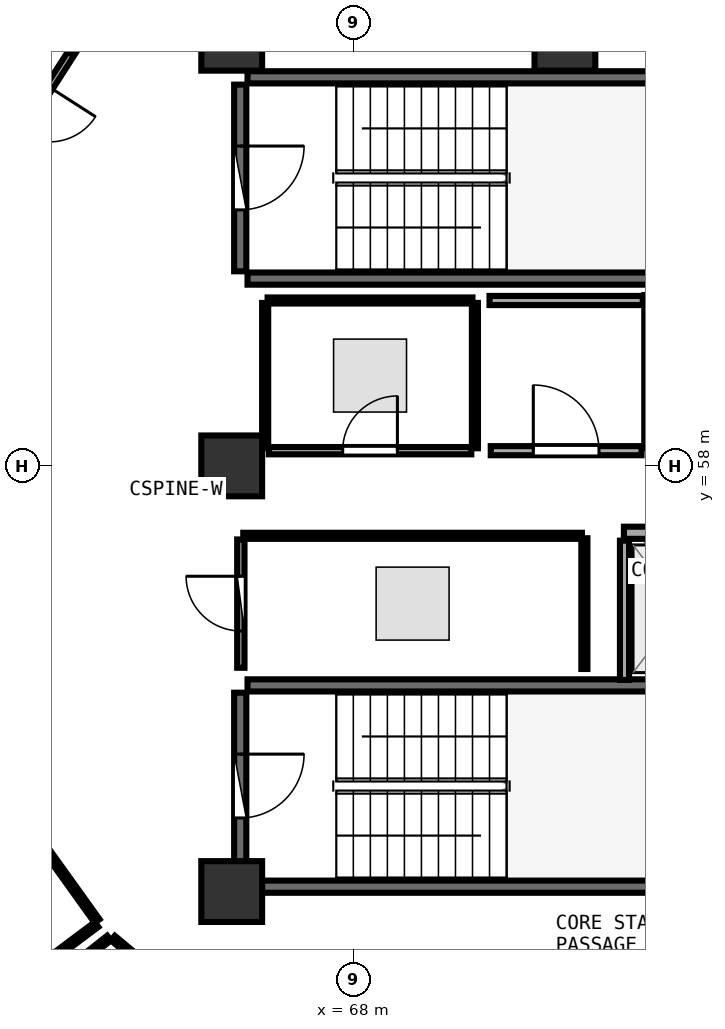
"""IFC4 building model, lengths in metres.
Left out: names, types, materials, properties, quantities, classifications, styles, units other than length and angle.
Written with IfcOpenShell. Run it as: python <this file> out.ifc"""

import sys

from ifc_helpers import new_model, si_unit, direction, frame, frame_2d, origin, origin_2d, place, context, subcontext, project, spatial, rectangle, extrude, element, fill, save


model = new_model("IFC4")
c1 = context("Model", 3, precision=1e-05, world=origin(), true_north=direction((0.0, 1.0)))
c2 = subcontext(c1, "Body", "Model", "MODEL_VIEW")
j1 = project(units=[si_unit("LENGTHUNIT", "METRE"), si_unit("PLANEANGLEUNIT", "RADIAN")], contexts=[c1])
p1 = place(None, origin())
s1 = spatial("IfcSite", under=j1, at=p1, CompositionType="ELEMENT")
p2 = place(p1, origin())
s2 = spatial("IfcBuilding", under=s1, at=p2, CompositionType="ELEMENT")
p3 = place(p2, frame((0.0, 0.0, 263.7)))
s3 = spatial("IfcBuildingStorey", under=s2, at=p3, CompositionType="ELEMENT", Elevation=263.7)
for number, where, z_axis, x_axis in (
    (1, (66.0, 51.0, 0.0), (0.0, 0.0, 1.0), (1.0, 0.0, 0.0)),
    (2, (71.48, 65.0, 0.0), (0.0, 0.0, 1.0), (1.0, 0.0, 0.0)),
    (3, (66.0, 65.0, 0.0), (0.0, 0.0, 1.0), (1.0, 0.0, 0.0)),
    (4, (66.0, 58.0, 0.0), (0.0, 0.0, 1.0), (1.0, 0.0, 0.0)),
):
    element("IfcColumn", number, at=place(p3, frame(where, z_axis=z_axis, x_axis=x_axis)), inside=s3, PredefinedType="PILASTER", context=c2, shape_type="SweptSolid", body=[
        extrude(rectangle(XDim=1.0, YDim=1.0, at=origin_2d()), origin(), (0.0, 0.0, 1.0), 3.75),
    ])
for number, where, z_axis, x_axis in (
    (5, (66.26, 61.08, 0.0), (0.0, 0.0, 1.0), (1.0, 0.0, 0.0)),
    (6, (73.42, 64.39, 0.0), (0.0, 0.0, 1.0), (-1.0, 0.0, 0.0)),
):
    element("IfcWall", number, at=place(p3, frame(where, z_axis=z_axis, x_axis=x_axis)), inside=s3, PredefinedType="SHEAR", context=c2, shape_type="SweptSolid", body=[
        extrude(rectangle(XDim=7.16, YDim=0.2, at=frame_2d((3.58, 0.0))), origin(), (0.0, 0.0, 1.0), 3.49),
    ])
p4 = place(p3, frame((66.14, 64.27, 0.0), z_axis=(0.0, 0.0, 1.0), x_axis=(0.0, -1.0, 0.0)))
e7 = element("IfcWall", 7, at=p4, inside=s3, PredefinedType="SHEAR", context=c2, shape_type="SweptSolid", body=[
    extrude(rectangle(XDim=3.07, YDim=0.2, at=frame_2d((1.535, 0.0))), origin(), (0.0, 0.0, 1.0), 3.49),
])
p5 = place(p4, frame((1.01, 0.0, 0.0)))
e8 = element("IfcOpeningElement", 8, at=p5, cuts=e7, PredefinedType="OPENING", context=c2, shape_type="SweptSolid", body=[
    extrude(rectangle(XDim=1.05, YDim=2.1, at=frame_2d((0.525, 1.05))), frame((0.0, 0.11, 0.0), z_axis=(0.0, -1.0, 0.0), x_axis=(1.0, 0.0, 0.0)), (0.0, 0.0, 1.0), 0.22),
])
for number, where, z_axis, x_axis in (
    (9, (66.26, 51.08, 0.0), (0.0, 0.0, 1.0), (1.0, 0.0, 0.0)),
    (10, (73.42, 54.39, 0.0), (0.0, 0.0, 1.0), (-1.0, 0.0, 0.0)),
):
    element("IfcWall", number, at=place(p3, frame(where, z_axis=z_axis, x_axis=x_axis)), inside=s3, PredefinedType="SHEAR", context=c2, shape_type="SweptSolid", body=[
        extrude(rectangle(XDim=7.16, YDim=0.2, at=frame_2d((3.58, 0.0))), origin(), (0.0, 0.0, 1.0), 3.49),
    ])
p6 = place(p3, frame((66.14, 54.27, 0.0), z_axis=(0.0, 0.0, 1.0), x_axis=(0.0, -1.0, 0.0)))
e11 = element("IfcWall", 11, at=p6, inside=s3, PredefinedType="SHEAR", context=c2, shape_type="SweptSolid", body=[
    extrude(rectangle(XDim=3.07, YDim=0.2, at=frame_2d((1.535, 0.0))), origin(), (0.0, 0.0, 1.0), 3.49),
])
p7 = place(p6, frame((1.01, 0.0, 0.0)))
e12 = element("IfcOpeningElement", 12, at=p7, cuts=e11, PredefinedType="OPENING", context=c2, shape_type="SweptSolid", body=[
    extrude(rectangle(XDim=1.05, YDim=2.1, at=frame_2d((0.525, 1.05))), frame((0.0, 0.11, 0.0), z_axis=(0.0, -1.0, 0.0), x_axis=(1.0, 0.0, 0.0)), (0.0, 0.0, 1.0), 0.22),
])
p8 = place(p3, frame((72.45, 56.9, 0.0), z_axis=(0.0, 0.0, 1.0), x_axis=(1.0, 0.0, 0.0)))
e13 = element("IfcWall", 13, at=p8, inside=s3, PredefinedType="SOLIDWALL", context=c2, shape_type="SweptSolid", body=[
    extrude(rectangle(XDim=8.4, YDim=0.2, at=frame_2d((4.2, 0.0))), origin(), (0.0, 0.0, 1.0), 3.48),
])
p9 = place(p8, frame((0.4, 0.0, 0.0)))
e14 = element("IfcOpeningElement", 14, at=p9, cuts=e13, PredefinedType="OPENING", context=c2, shape_type="SweptSolid", body=[
    extrude(rectangle(XDim=1.1, YDim=2.1, at=frame_2d((0.55, 1.05))), frame((0.0, 0.11, 0.0), z_axis=(0.0, -1.0, 0.0), x_axis=(1.0, 0.0, 0.0)), (0.0, 0.0, 1.0), 0.22),
])
p10 = place(p8, frame((2.4, 0.0, 0.0)))
e15 = element("IfcOpeningElement", 15, at=p10, cuts=e13, PredefinedType="OPENING", context=c2, shape_type="SweptSolid", body=[
    extrude(rectangle(XDim=1.1, YDim=2.1, at=frame_2d((0.55, 1.05))), frame((0.0, 0.11, 0.0), z_axis=(0.0, -1.0, 0.0), x_axis=(1.0, 0.0, 0.0)), (0.0, 0.0, 1.0), 0.22),
])
p11 = place(p3, frame((72.46, 54.48, 0.0), z_axis=(0.0, 0.0, 1.0), x_axis=(0.0, 1.0, 0.0)))
e16 = element("IfcWall", 16, at=p11, inside=s3, PredefinedType="PARTITIONING", context=c2, shape_type="SweptSolid", body=[
    extrude(rectangle(XDim=2.29, YDim=0.15, at=frame_2d((1.145, 0.0))), origin(), (0.0, 0.0, 1.0), 3.48),
])
p12 = place(p3, frame((66.61, 58.25, 0.0), z_axis=(0.0, 0.0, 1.0), x_axis=(1.0, 0.0, 0.0)))
e17 = element("IfcWall", 17, at=p12, inside=s3, PredefinedType="PARTITIONING", context=c2, shape_type="SweptSolid", body=[
    extrude(rectangle(XDim=3.33, YDim=0.12, at=frame_2d((1.665, 0.0))), origin(), (0.0, 0.0, 1.0), 3.48),
])
p13 = place(p12, frame((1.215, 0.0, 0.0)))
e18 = element("IfcOpeningElement", 18, at=p13, cuts=e17, PredefinedType="OPENING", context=c2, shape_type="SweptSolid", body=[
    extrude(rectangle(XDim=0.9, YDim=2.08, at=frame_2d((0.45, 1.04))), frame((0.0, 0.07, 0.0), z_axis=(0.0, -1.0, 0.0), x_axis=(1.0, 0.0, 0.0)), (0.0, 0.0, 1.0), 0.14),
])
p14 = place(p3, frame((70.26, 58.25, 0.0), z_axis=(0.0, 0.0, 1.0), x_axis=(1.0, 0.0, 0.0)))
e19 = element("IfcWall", 19, at=p14, inside=s3, PredefinedType="PARTITIONING", context=c2, shape_type="SweptSolid", body=[
    extrude(rectangle(XDim=2.48, YDim=0.15, at=frame_2d((1.24, 0.0))), origin(), (0.0, 0.0, 1.0), 3.48),
])
p15 = place(p14, frame((0.7, 0.0, 0.0)))
e20 = element("IfcOpeningElement", 20, at=p15, cuts=e19, PredefinedType="OPENING", context=c2, shape_type="SweptSolid", body=[
    extrude(rectangle(XDim=1.08, YDim=2.1, at=frame_2d((0.54, 1.05))), frame((0.0, 0.085, 0.0), z_axis=(0.0, -1.0, 0.0), x_axis=(1.0, 0.0, 0.0)), (0.0, 0.0, 1.0), 0.17),
])
p16 = place(p3, frame((66.15, 54.68, 0.0), z_axis=(0.0, 0.0, 1.0), x_axis=(0.0, 1.0, 0.0)))
e21 = element("IfcWall", 21, at=p16, inside=s3, PredefinedType="PARTITIONING", context=c2, shape_type="SweptSolid", body=[
    extrude(rectangle(XDim=2.11, YDim=0.12, at=frame_2d((1.055, 0.0))), origin(), (0.0, 0.0, 1.0), 2.775),
])
p17 = place(p16, frame((0.605, 0.0, 0.0)))
e22 = element("IfcOpeningElement", 22, at=p17, cuts=e21, PredefinedType="OPENING", context=c2, shape_type="SweptSolid", body=[
    extrude(rectangle(XDim=0.9, YDim=2.08, at=frame_2d((0.45, 1.04))), frame((0.0, 0.07, 0.0), z_axis=(0.0, -1.0, 0.0), x_axis=(1.0, 0.0, 0.0)), (0.0, 0.0, 1.0), 0.14),
])
p18 = place(p3, frame((63.844, 65.542, 0.0), z_axis=(0.0, 0.0, 1.0), x_axis=(-0.539324099435, -0.842098281538, 0.0)))
e23 = element("IfcWall", 23, at=p18, inside=s3, PredefinedType="PARTITIONING", context=c2, shape_type="SweptSolid", body=[
    extrude(rectangle(XDim=4.022, YDim=0.12, at=frame_2d((2.011, 0.0))), origin(), (0.0, 0.0, 1.0), 3.075),
])
p19 = place(p18, frame((1.561, 0.0, 0.0)))
e24 = element("IfcOpeningElement", 24, at=p19, cuts=e23, PredefinedType="OPENING", context=c2, shape_type="SweptSolid", body=[
    extrude(rectangle(XDim=0.9, YDim=2.08, at=frame_2d((0.45, 1.04))), frame((0.0, 0.07, 0.0), z_axis=(0.0, -1.0, 0.0), x_axis=(1.0, 0.0, 0.0)), (0.0, 0.0, 1.0), 0.14),
])
p20 = place(p3, frame((72.86, 60.81, 0.0), z_axis=(0.0, 0.0, 1.0), x_axis=(0.0, -1.0, 0.0)))
e25 = element("IfcWall", 25, at=p20, inside=s3, PredefinedType="PARTITIONING", context=c2, shape_type="SweptSolid", body=[
    extrude(rectangle(XDim=2.52, YDim=0.15, at=frame_2d((1.26, 0.0))), origin(), (0.0, 0.0, 1.0), 3.48),
])
p21 = place(p3, frame((70.0, 58.29, 0.0), z_axis=(0.0, 0.0, 1.0), x_axis=(0.0, 1.0, 0.0)))
e26 = element("IfcWall", 26, at=p21, inside=s3, PredefinedType="PARTITIONING", context=c2, shape_type="SweptSolid", body=[
    extrude(rectangle(XDim=2.39, YDim=0.1, at=frame_2d((1.195, 0.0))), origin(), (0.0, 0.0, 1.0), 3.48),
])
p22 = place(p3, frame((69.96, 60.72, 0.0), z_axis=(0.0, 0.0, 1.0), x_axis=(-1.0, 0.0, 0.0)))
e27 = element("IfcWall", 27, at=p22, inside=s3, PredefinedType="PARTITIONING", context=c2, shape_type="SweptSolid", body=[
    extrude(rectangle(XDim=3.37, YDim=0.1, at=frame_2d((1.685, 0.0))), origin(), (0.0, 0.0, 1.0), 3.48),
])
p23 = place(p3, frame((66.55, 60.68, 0.0), z_axis=(0.0, 0.0, 1.0), x_axis=(0.0, -1.0, 0.0)))
e28 = element("IfcWall", 28, at=p23, inside=s3, PredefinedType="PARTITIONING", context=c2, shape_type="SweptSolid", body=[
    extrude(rectangle(XDim=2.39, YDim=0.1, at=frame_2d((1.195, 0.0))), origin(), (0.0, 0.0, 1.0), 3.48),
])
p24 = place(p3, frame((72.76, 60.72, 0.0), z_axis=(0.0, 0.0, 1.0), x_axis=(-1.0, 0.0, 0.0)))
e29 = element("IfcWall", 29, at=p24, inside=s3, PredefinedType="PARTITIONING", context=c2, shape_type="SweptSolid", body=[
    extrude(rectangle(XDim=2.52, YDim=0.15, at=frame_2d((1.26, 0.0))), origin(), (0.0, 0.0, 1.0), 3.48),
])
p25 = place(p3, frame((71.8, 54.66, 0.0), z_axis=(0.0, 0.0, 1.0), x_axis=(0.0, 1.0, 0.0)))
e30 = element("IfcWall", 30, at=p25, inside=s3, PredefinedType="PARTITIONING", context=c2, shape_type="SweptSolid", body=[
    extrude(rectangle(XDim=2.15, YDim=0.1, at=frame_2d((1.075, 0.0))), origin(), (0.0, 0.0, 1.0), 3.48),
])
p26 = place(p3, frame((71.76, 56.85, 0.0), z_axis=(0.0, 0.0, 1.0), x_axis=(-1.0, 0.0, 0.0)))
e31 = element("IfcWall", 31, at=p26, inside=s3, PredefinedType="PARTITIONING", context=c2, shape_type="SweptSolid", body=[
    extrude(rectangle(XDim=5.57, YDim=0.1, at=frame_2d((2.785, 0.0))), origin(), (0.0, 0.0, 1.0), 2.775),
])
p27 = place(p3, frame((62.23, 52.684, 0.0), z_axis=(0.0, 0.0, 1.0), x_axis=(0.582725386778, -0.812669135383, 0.0)))
e32 = element("IfcWall", 32, at=p27, inside=s3, PredefinedType="PARTITIONING", context=c2, shape_type="SweptSolid", body=[
    extrude(rectangle(XDim=2.669, YDim=0.1, at=frame_2d((1.334, 0.0))), origin(), (0.0, 0.0, 1.0), 3.075),
])
p28 = place(p3, frame((63.777, 50.458, 0.0), z_axis=(0.0, 0.0, 1.0), x_axis=(-0.800384816546, -0.599486568191, 0.0)))
e33 = element("IfcWall", 33, at=p28, inside=s3, PredefinedType="PARTITIONING", context=c2, shape_type="SweptSolid", body=[
    extrude(rectangle(XDim=4.414, YDim=0.1, at=frame_2d((2.207, 0.0))), origin(), (0.0, 0.0, 1.0), 3.175),
])
p29 = place(p3, frame((64.046, 50.234, 0.0), z_axis=(0.0, 0.0, 1.0), x_axis=(0.767022676895, -0.641619991216, 0.0)))
e34 = element("IfcWall", 34, at=p29, inside=s3, PredefinedType="PARTITIONING", context=c2, shape_type="SweptSolid", body=[
    extrude(rectangle(XDim=2.741, YDim=0.1, at=frame_2d((1.371, 0.0))), origin(), (0.0, 0.0, 1.0), 3.075),
])
p30 = place(p3, frame((60.468, 47.468, 0.0), z_axis=(0.0, 0.0, 1.0), x_axis=(0.785736749878, 0.618561039745, 0.0)))
e35 = element("IfcWall", 35, at=p30, inside=s3, PredefinedType="PARTITIONING", context=c2, shape_type="SweptSolid", body=[
    extrude(rectangle(XDim=4.475, YDim=0.1, at=frame_2d((2.237, 0.0))), origin(), (0.0, 0.0, 1.0), 3.075),
])
p31 = place(p5, origin())
e36 = element("IfcDoor", 36, at=p31, inside=s3, OperationType="SINGLE_SWING_LEFT", PredefinedType="DOOR", context=c2, shape_type="SweptSolid", body=[
    extrude(rectangle(XDim=1.05, YDim=2.1, at=frame_2d((0.525, 1.05))), frame((0.0, 0.025, 0.0), z_axis=(0.0, -1.0, 0.0), x_axis=(1.0, 0.0, 0.0)), (0.0, 0.0, 1.0), 0.05),
])
fill(e8, e36)
p32 = place(p7, origin())
e37 = element("IfcDoor", 37, at=p32, inside=s3, OperationType="SINGLE_SWING_LEFT", PredefinedType="DOOR", context=c2, shape_type="SweptSolid", body=[
    extrude(rectangle(XDim=1.05, YDim=2.1, at=frame_2d((0.525, 1.05))), frame((0.0, 0.025, 0.0), z_axis=(0.0, -1.0, 0.0), x_axis=(1.0, 0.0, 0.0)), (0.0, 0.0, 1.0), 0.05),
])
fill(e12, e37)
p33 = place(p13, origin())
e38 = element("IfcDoor", 38, at=p33, inside=s3, OperationType="SINGLE_SWING_RIGHT", PredefinedType="DOOR", context=c2, shape_type="SweptSolid", body=[
    extrude(rectangle(XDim=0.9, YDim=2.08, at=frame_2d((0.45, 1.04))), frame((0.0, 0.025, 0.0), z_axis=(0.0, -1.0, 0.0), x_axis=(1.0, 0.0, 0.0)), (0.0, 0.0, 1.0), 0.05),
])
fill(e18, e38)
p34 = place(p15, origin())
e39 = element("IfcDoor", 39, at=p34, inside=s3, OperationType="SINGLE_SWING_LEFT", PredefinedType="DOOR", context=c2, shape_type="SweptSolid", body=[
    extrude(rectangle(XDim=1.08, YDim=2.1, at=frame_2d((0.54, 1.05))), frame((0.0, 0.025, 0.0), z_axis=(0.0, -1.0, 0.0), x_axis=(1.0, 0.0, 0.0)), (0.0, 0.0, 1.0), 0.05),
])
fill(e20, e39)
p35 = place(p17, origin())
e40 = element("IfcDoor", 40, at=p35, inside=s3, OperationType="SINGLE_SWING_RIGHT", PredefinedType="DOOR", context=c2, shape_type="SweptSolid", body=[
    extrude(rectangle(XDim=0.9, YDim=2.08, at=frame_2d((0.45, 1.04))), frame((0.0, 0.025, 0.0), z_axis=(0.0, -1.0, 0.0), x_axis=(1.0, 0.0, 0.0)), (0.0, 0.0, 1.0), 0.05),
])
fill(e22, e40)
save(model, sys.argv[1])
